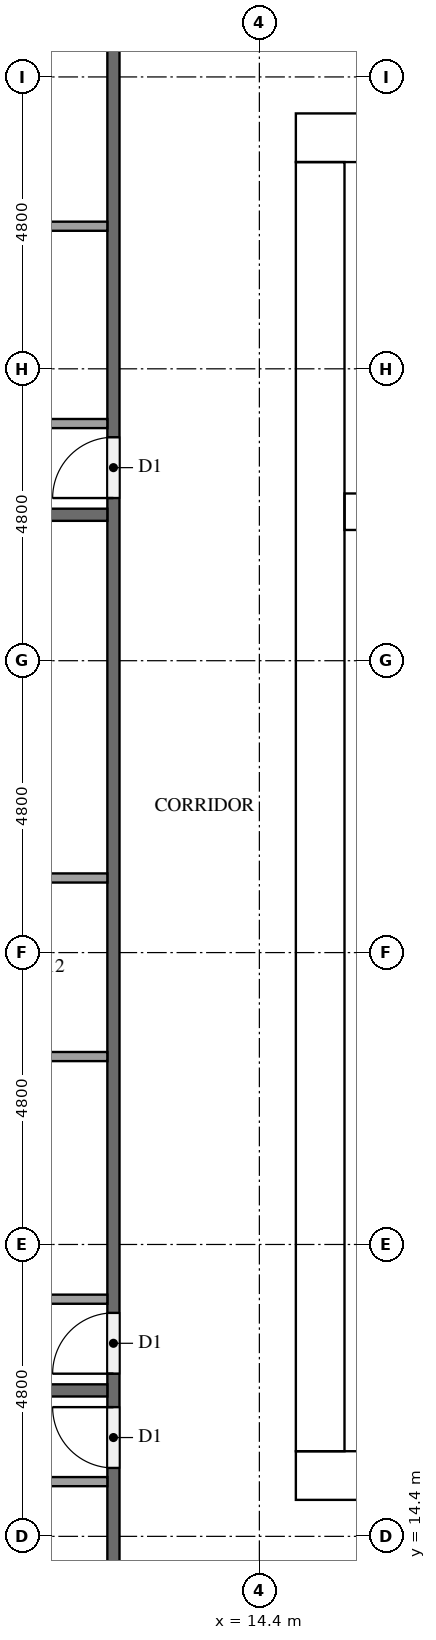
"""IFC4 building model, lengths in metres.
Left out: names, types, materials, properties, quantities, classifications, styles, units other than length and angle.
Written with IfcOpenShell. Run it as: python <this file> out.ifc"""

import sys

from ifc_helpers import new_model, si_unit, direction, frame, frame_2d, origin, place, context, subcontext, project, spatial, rectangle, extrude, element, fill, save


model = new_model("IFC4")
c1 = context("Model", 3, precision=1e-05, world=origin(), true_north=direction((0.0, 1.0)))
c2 = subcontext(c1, "Body", "Model", "MODEL_VIEW")
j1 = project(units=[si_unit("LENGTHUNIT", "METRE"), si_unit("PLANEANGLEUNIT", "RADIAN")], contexts=[c1])
p1 = place(None, origin())
s1 = spatial("IfcSite", under=j1, at=p1, CompositionType="ELEMENT")
p2 = place(p1, origin())
s2 = spatial("IfcBuilding", under=s1, at=p2, CompositionType="ELEMENT")
p3 = place(p2, frame((0.0, 0.0, 170.0)))
s3 = spatial("IfcBuildingStorey", under=s2, at=p3, CompositionType="ELEMENT", Elevation=170.0)
p4 = place(p3, frame((15.0, 15.4, 0.0), z_axis=(0.0, 0.0, 1.0), x_axis=(1.0, 0.0, 0.0)))
e1 = element("IfcWall", 1, at=p4, inside=s3, PredefinedType="SHEAR", context=c2, shape_type="SweptSolid", body=[
    extrude(rectangle(XDim=32.4, YDim=0.8, at=frame_2d((16.2, 0.0))), origin(), (0.0, 0.0, 1.0), 3.1),
])
p5 = place(p4, frame((15.3, 0.0, 0.0)))
e2 = element("IfcOpeningElement", 2, at=p5, cuts=e1, PredefinedType="OPENING", context=c2, shape_type="SweptSolid", body=[
    extrude(rectangle(XDim=1.8, YDim=2.1, at=frame_2d((0.9, 1.05))), frame((0.0, 0.41, 0.0), z_axis=(0.0, -1.0, 0.0), x_axis=(1.0, 0.0, 0.0)), (0.0, 0.0, 1.0), 0.82),
])
p6 = place(p3, frame((15.0, 37.4, 0.0), z_axis=(0.0, 0.0, 1.0), x_axis=(1.0, 0.0, 0.0)))
e3 = element("IfcWall", 3, at=p6, inside=s3, PredefinedType="SHEAR", context=c2, shape_type="SweptSolid", body=[
    extrude(rectangle(XDim=32.4, YDim=0.8, at=frame_2d((16.2, 0.0))), origin(), (0.0, 0.0, 1.0), 3.1),
])
p7 = place(p6, frame((15.3, 0.0, 0.0)))
e4 = element("IfcOpeningElement", 4, at=p7, cuts=e3, PredefinedType="OPENING", context=c2, shape_type="SweptSolid", body=[
    extrude(rectangle(XDim=1.8, YDim=2.1, at=frame_2d((0.9, 1.05))), frame((0.0, 0.41, 0.0), z_axis=(0.0, -1.0, 0.0), x_axis=(1.0, 0.0, 0.0)), (0.0, 0.0, 1.0), 0.82),
])
p8 = place(p6, frame((1.51, 0.0, 0.0)))
e5 = element("IfcOpeningElement", 5, at=p8, cuts=e3, PredefinedType="OPENING", context=c2, shape_type="SweptSolid", body=[
    extrude(rectangle(XDim=1.0, YDim=2.1, at=frame_2d((0.5, 1.05))), frame((0.0, 0.41, 0.0), z_axis=(0.0, -1.0, 0.0), x_axis=(1.0, 0.0, 0.0)), (0.0, 0.0, 1.0), 0.82),
])
p9 = place(p6, frame((5.11, 0.0, 0.0)))
e6 = element("IfcOpeningElement", 6, at=p9, cuts=e3, PredefinedType="OPENING", context=c2, shape_type="SweptSolid", body=[
    extrude(rectangle(XDim=1.0, YDim=2.1, at=frame_2d((0.5, 1.05))), frame((0.0, 0.41, 0.0), z_axis=(0.0, -1.0, 0.0), x_axis=(1.0, 0.0, 0.0)), (0.0, 0.0, 1.0), 0.82),
])
p10 = place(p3, frame((15.4, 15.8, 0.0), z_axis=(0.0, 0.0, 1.0), x_axis=(0.0, 1.0, 0.0)))
e7 = element("IfcWall", 7, at=p10, inside=s3, PredefinedType="SHEAR", context=c2, shape_type="SweptSolid", body=[
    extrude(rectangle(XDim=21.2, YDim=0.8, at=frame_2d((10.6, 0.0))), origin(), (0.0, 0.0, 1.0), 3.1),
])
p11 = place(p10, frame((4.96, 0.0, 0.0)))
e8 = element("IfcOpeningElement", 8, at=p11, cuts=e7, PredefinedType="OPENING", context=c2, shape_type="SweptSolid", body=[
    extrude(rectangle(XDim=1.2, YDim=2.1, at=frame_2d((0.6, 1.05))), frame((0.0, 0.41, 0.0), z_axis=(0.0, -1.0, 0.0), x_axis=(1.0, 0.0, 0.0)), (0.0, 0.0, 1.0), 0.82),
])
p12 = place(p3, frame((15.8, 31.25, 0.0), z_axis=(0.0, 0.0, 1.0), x_axis=(1.0, 0.0, 0.0)))
e9 = element("IfcWall", 9, at=p12, inside=s3, PredefinedType="SHEAR", context=c2, shape_type="SweptSolid", body=[
    extrude(rectangle(XDim=7.0, YDim=0.6, at=frame_2d((3.5, 0.0))), origin(), (0.0, 0.0, 1.0), 3.1),
])
p13 = place(p3, frame((12.0, 12.1, 0.0), z_axis=(0.0, 0.0, 1.0), x_axis=(0.0, 1.0, 0.0)))
e10 = element("IfcWall", 10, at=p13, inside=s3, PredefinedType="PARTITIONING", context=c2, shape_type="SweptSolid", body=[
    extrude(rectangle(XDim=28.6, YDim=0.2, at=frame_2d((14.3, 0.0))), origin(), (0.0, 0.0, 1.0), 3.1),
])
p14 = place(p13, frame((19.375, 0.0, 0.0)))
e11 = element("IfcOpeningElement", 11, at=p14, cuts=e10, PredefinedType="OPENING", context=c2, shape_type="SweptSolid", body=[
    extrude(rectangle(XDim=1.0, YDim=2.1, at=frame_2d((0.5, 1.05))), frame((0.0, 0.11, 0.0), z_axis=(0.0, -1.0, 0.0), x_axis=(1.0, 0.0, 0.0)), (0.0, 0.0, 1.0), 0.22),
])
p15 = place(p13, frame((4.975, 0.0, 0.0)))
e12 = element("IfcOpeningElement", 12, at=p15, cuts=e10, PredefinedType="OPENING", context=c2, shape_type="SweptSolid", body=[
    extrude(rectangle(XDim=1.0, YDim=2.1, at=frame_2d((0.5, 1.05))), frame((0.0, 0.11, 0.0), z_axis=(0.0, -1.0, 0.0), x_axis=(1.0, 0.0, 0.0)), (0.0, 0.0, 1.0), 0.22),
])
p16 = place(p13, frame((3.425, 0.0, 0.0)))
e13 = element("IfcOpeningElement", 13, at=p16, cuts=e10, PredefinedType="OPENING", context=c2, shape_type="SweptSolid", body=[
    extrude(rectangle(XDim=1.0, YDim=2.1, at=frame_2d((0.5, 1.05))), frame((0.0, 0.11, 0.0), z_axis=(0.0, -1.0, 0.0), x_axis=(1.0, 0.0, 0.0)), (0.0, 0.0, 1.0), 0.22),
])
for number, where, z_axis, x_axis in (
    (14, (0.1, 31.2, 0.0), (0.0, 0.0, 1.0), (1.0, 0.0, 0.0)),
    (15, (0.1, 16.8, 0.0), (0.0, 0.0, 1.0), (1.0, 0.0, 0.0)),
):
    element("IfcWall", number, at=place(p3, frame(where, z_axis=z_axis, x_axis=x_axis)), inside=s3, PredefinedType="PARTITIONING", context=c2, shape_type="SweptSolid", body=[
        extrude(rectangle(XDim=11.8, YDim=0.2, at=frame_2d((5.9, 0.0))), origin(), (0.0, 0.0, 1.0), 3.1),
    ])
p17 = place(p3, frame((11.9, 35.945, 0.0), z_axis=(0.0, 0.0, 1.0), x_axis=(-1.0, 0.0, 0.0)))
e16 = element("IfcWall", 16, at=p17, inside=s3, PredefinedType="PARTITIONING", context=c2, shape_type="SweptSolid", body=[
    extrude(rectangle(XDim=4.475, YDim=0.15, at=frame_2d((2.237, 0.0))), origin(), (0.0, 0.0, 1.0), 3.1),
])
p18 = place(p3, frame((11.9, 32.7, 0.0), z_axis=(0.0, 0.0, 1.0), x_axis=(-1.0, 0.0, 0.0)))
e17 = element("IfcWall", 17, at=p18, inside=s3, PredefinedType="PARTITIONING", context=c2, shape_type="SweptSolid", body=[
    extrude(rectangle(XDim=4.625, YDim=0.15, at=frame_2d((2.312, 0.0))), origin(), (0.0, 0.0, 1.0), 3.1),
])
for number, where, z_axis, x_axis in (
    (18, (11.9, 22.29, 0.0), (0.0, 0.0, 1.0), (-1.0, 0.0, 0.0)),
    (19, (11.9, 25.227, 0.0), (0.0, 0.0, 1.0), (-1.0, 0.0, 0.0)),
):
    element("IfcWall", number, at=place(p3, frame(where, z_axis=z_axis, x_axis=x_axis)), inside=s3, PredefinedType="PARTITIONING", context=c2, shape_type="SweptSolid", body=[
        extrude(rectangle(XDim=4.475, YDim=0.15, at=frame_2d((2.237, 0.0))), origin(), (0.0, 0.0, 1.0), 3.1),
    ])
p19 = place(p3, frame((11.9, 18.3, 0.0), z_axis=(0.0, 0.0, 1.0), x_axis=(-1.0, 0.0, 0.0)))
e20 = element("IfcWall", 20, at=p19, inside=s3, PredefinedType="PARTITIONING", context=c2, shape_type="SweptSolid", body=[
    extrude(rectangle(XDim=4.625, YDim=0.15, at=frame_2d((2.312, 0.0))), origin(), (0.0, 0.0, 1.0), 3.1),
])
p20 = place(p3, frame((11.9, 15.3, 0.0), z_axis=(0.0, 0.0, 1.0), x_axis=(-1.0, 0.0, 0.0)))
e21 = element("IfcWall", 21, at=p20, inside=s3, PredefinedType="PARTITIONING", context=c2, shape_type="SweptSolid", body=[
    extrude(rectangle(XDim=3.125, YDim=0.15, at=frame_2d((1.562, 0.0))), origin(), (0.0, 0.0, 1.0), 3.1),
])
p21 = place(p11, frame((1.2, 0.0, 0.0), z_axis=(0.0, 0.0, 1.0), x_axis=(-1.0, 0.0, 0.0)))
e22 = element("IfcDoor", 22, at=p21, inside=s3, OperationType="SINGLE_SWING_LEFT", PredefinedType="DOOR", context=c2, shape_type="SweptSolid", body=[
    extrude(rectangle(XDim=1.2, YDim=2.1, at=frame_2d((0.6, 1.05))), frame((0.0, 0.025, 0.0), z_axis=(0.0, -1.0, 0.0), x_axis=(1.0, 0.0, 0.0)), (0.0, 0.0, 1.0), 0.05),
])
fill(e8, e22)
p22 = place(p14, origin())
e23 = element("IfcDoor", 23, at=p22, inside=s3, OperationType="SINGLE_SWING_LEFT", PredefinedType="DOOR", context=c2, shape_type="SweptSolid", body=[
    extrude(rectangle(XDim=1.0, YDim=2.1, at=frame_2d((0.5, 1.05))), frame((0.0, 0.025, 0.0), z_axis=(0.0, -1.0, 0.0), x_axis=(1.0, 0.0, 0.0)), (0.0, 0.0, 1.0), 0.05),
])
fill(e11, e23)
p23 = place(p15, origin())
e24 = element("IfcDoor", 24, at=p23, inside=s3, OperationType="SINGLE_SWING_LEFT", PredefinedType="DOOR", context=c2, shape_type="SweptSolid", body=[
    extrude(rectangle(XDim=1.0, YDim=2.1, at=frame_2d((0.5, 1.05))), frame((0.0, 0.025, 0.0), z_axis=(0.0, -1.0, 0.0), x_axis=(1.0, 0.0, 0.0)), (0.0, 0.0, 1.0), 0.05),
])
fill(e12, e24)
p24 = place(p16, origin())
e25 = element("IfcDoor", 25, at=p24, inside=s3, OperationType="SINGLE_SWING_RIGHT", PredefinedType="DOOR", context=c2, shape_type="SweptSolid", body=[
    extrude(rectangle(XDim=1.0, YDim=2.1, at=frame_2d((0.5, 1.05))), frame((0.0, 0.025, 0.0), z_axis=(0.0, -1.0, 0.0), x_axis=(1.0, 0.0, 0.0)), (0.0, 0.0, 1.0), 0.05),
])
fill(e13, e25)
save(model, sys.argv[1])
